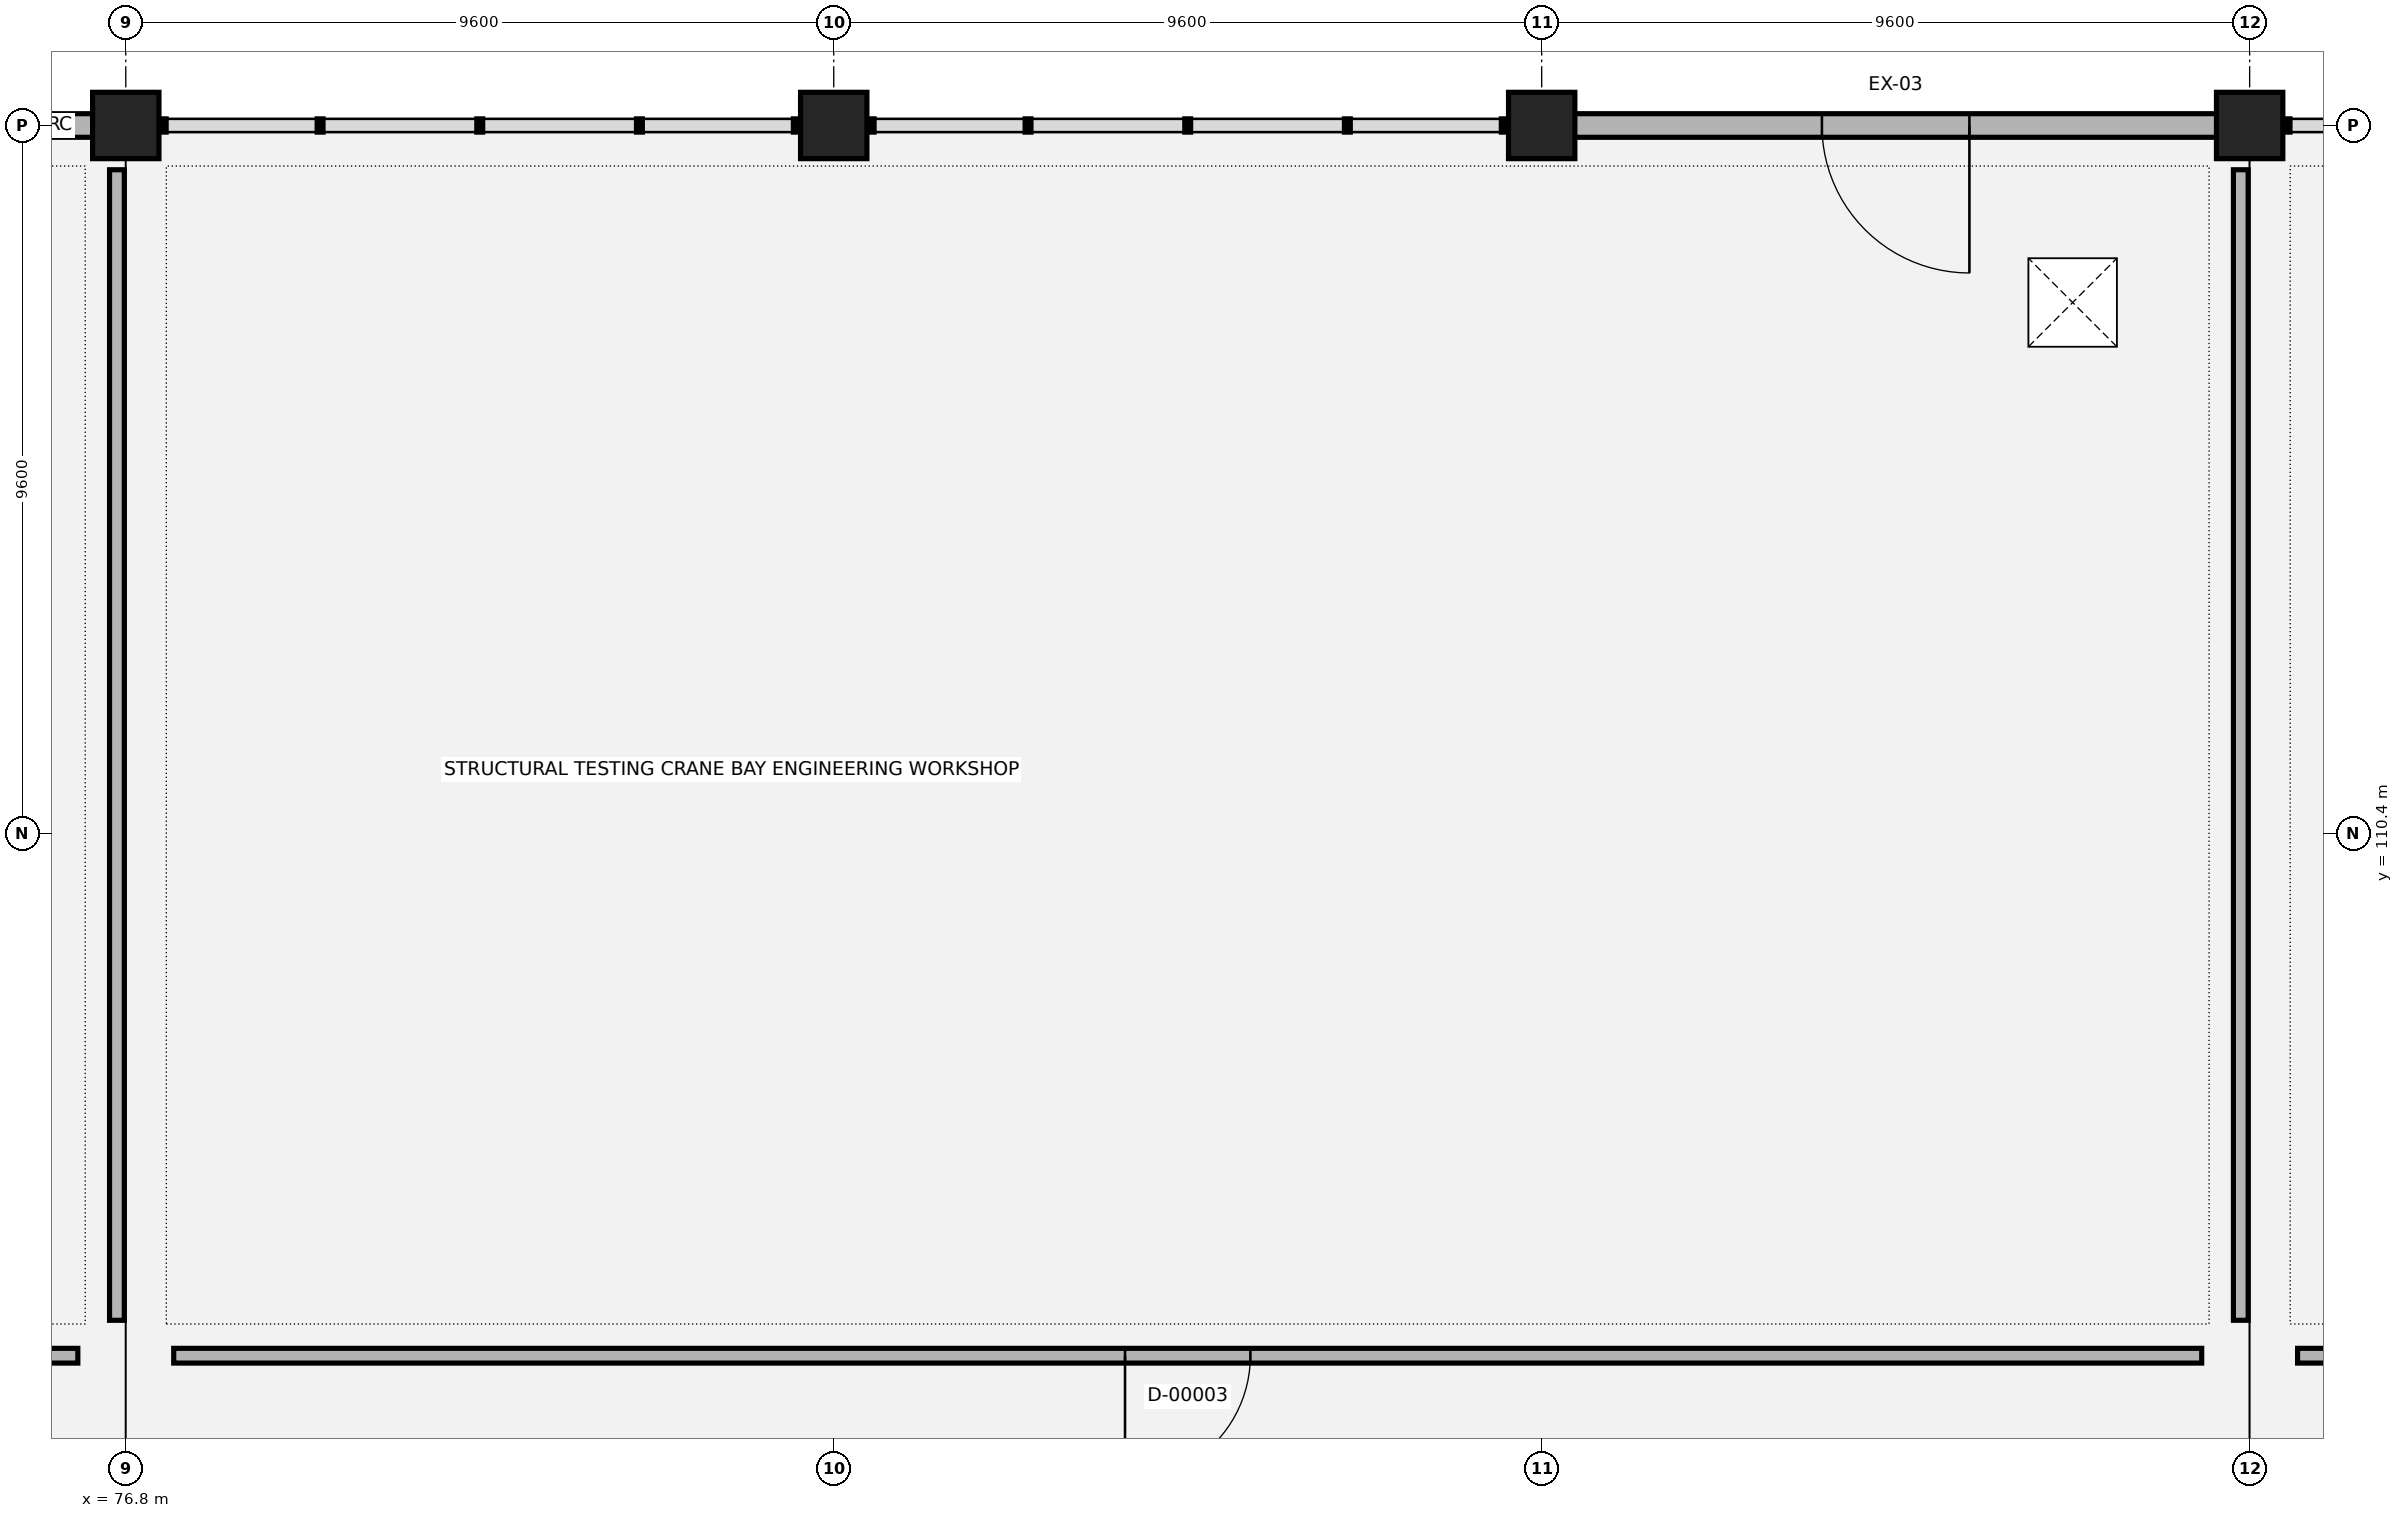
"""IFC4 building model, lengths in metres.
Left out: names, types, materials, properties, quantities, classifications, styles, units other than length and angle.
Written with IfcOpenShell. Run it as: python <this file> out.ifc"""

import sys

from ifc_helpers import new_model, si_unit, direction, frame, frame_2d, origin, origin_2d, place, context, subcontext, project, spatial, rectangle, extrude, element, fill, save


model = new_model("IFC4")
c1 = context("Model", 3, precision=1e-05, world=origin(), true_north=direction((0.0, 1.0)))
c2 = subcontext(c1, "Body", "Model", "MODEL_VIEW")
j1 = project(units=[si_unit("LENGTHUNIT", "METRE"), si_unit("PLANEANGLEUNIT", "RADIAN")], contexts=[c1])
p1 = place(None, origin())
s1 = spatial("IfcSite", under=j1, at=p1, CompositionType="ELEMENT")
p2 = place(p1, origin())
s2 = spatial("IfcBuilding", under=s1, at=p2, CompositionType="ELEMENT")
p3 = place(p2, origin())
s3 = spatial("IfcBuildingStorey", under=s2, at=p3, CompositionType="ELEMENT", Elevation=0.0)
for number, where, z_axis, x_axis in (
    (1, (76.8, 120.0, 0.0), (0.0, 0.0, 1.0), (1.0, 0.0, 0.0)),
    (2, (86.4, 120.0, 0.0), (0.0, 0.0, 1.0), (1.0, 0.0, 0.0)),
    (3, (96.0, 120.0, 0.0), (0.0, 0.0, 1.0), (1.0, 0.0, 0.0)),
    (4, (105.6, 120.0, 0.0), (0.0, 0.0, 1.0), (1.0, 0.0, 0.0)),
):
    element("IfcColumn", number, at=place(p3, frame(where, z_axis=z_axis, x_axis=x_axis)), inside=s3, PredefinedType="COLUMN", context=c2, shape_type="SweptSolid", body=[
        extrude(rectangle(XDim=0.9, YDim=0.9, at=origin_2d()), origin(), (0.0, 0.0, 1.0), 5.4),
    ])
p4 = place(p3, frame((76.42, 120.0, 0.0), z_axis=(0.0, 0.0, 1.0), x_axis=(-1.0, 0.0, 0.0)))
e5 = element("IfcWall", 5, at=p4, inside=s3, PredefinedType="SOLIDWALL", context=c2, shape_type="SweptSolid", body=[
    extrude(rectangle(XDim=8.84, YDim=0.32, at=frame_2d((4.42, 0.0))), origin(), (0.0, 0.0, 1.0), 4.04),
])
p5 = place(p4, frame((3.42, 0.0, 0.0)))
e6 = element("IfcOpeningElement", 6, at=p5, cuts=e5, PredefinedType="OPENING", context=c2, shape_type="SweptSolid", body=[
    extrude(rectangle(XDim=2.0, YDim=2.2, at=frame_2d((1.0, 1.1))), frame((0.0, 0.17, 0.0), z_axis=(0.0, -1.0, 0.0), x_axis=(1.0, 0.0, 0.0)), (0.0, 0.0, 1.0), 0.34),
])
p6 = place(p3, frame((105.22, 120.0, 0.0), z_axis=(0.0, 0.0, 1.0), x_axis=(-1.0, 0.0, 0.0)))
e7 = element("IfcWall", 7, at=p6, inside=s3, PredefinedType="SOLIDWALL", context=c2, shape_type="SweptSolid", body=[
    extrude(rectangle(XDim=8.84, YDim=0.32, at=frame_2d((4.42, 0.0))), origin(), (0.0, 0.0, 1.0), 4.04),
])
p7 = place(p6, frame((3.42, 0.0, 0.0)))
e8 = element("IfcOpeningElement", 8, at=p7, cuts=e7, PredefinedType="OPENING", context=c2, shape_type="SweptSolid", body=[
    extrude(rectangle(XDim=2.0, YDim=2.2, at=frame_2d((1.0, 1.1))), frame((0.0, 0.17, 0.0), z_axis=(0.0, -1.0, 0.0), x_axis=(1.0, 0.0, 0.0)), (0.0, 0.0, 1.0), 0.34),
])
p8 = place(p3, frame((48.65, 103.32, 0.0), z_axis=(0.0, 0.0, 1.0), x_axis=(1.0, 0.0, 0.0)))
e9 = element("IfcWall", 9, at=p8, inside=s3, PredefinedType="PARTITIONING", context=c2, shape_type="SweptSolid", body=[
    extrude(rectangle(XDim=27.5, YDim=0.2, at=frame_2d((13.75, 0.0))), origin(), (0.0, 0.0, 1.0), 4.04),
])
p9 = place(p8, frame((4.135, 0.0, 0.0)))
e10 = element("IfcOpeningElement", 10, at=p9, cuts=e9, PredefinedType="OPENING", context=c2, shape_type="SweptSolid", body=[
    extrude(rectangle(XDim=1.8, YDim=2.2, at=frame_2d((0.9, 1.1))), frame((0.0, 0.11, 0.0), z_axis=(0.0, -1.0, 0.0), x_axis=(1.0, 0.0, 0.0)), (0.0, 0.0, 1.0), 0.22),
])
p10 = place(p3, frame((76.68, 103.8, 0.0), z_axis=(0.0, 0.0, 1.0), x_axis=(0.0, 1.0, 0.0)))
e11 = element("IfcWall", 11, at=p10, inside=s3, PredefinedType="PARTITIONING", context=c2, shape_type="SweptSolid", body=[
    extrude(rectangle(XDim=15.6, YDim=0.2, at=frame_2d((7.8, 0.0))), origin(), (0.0, 0.0, 1.0), 4.04),
])
p11 = place(p3, frame((77.45, 103.32, 0.0), z_axis=(0.0, 0.0, 1.0), x_axis=(1.0, 0.0, 0.0)))
e12 = element("IfcWall", 12, at=p11, inside=s3, PredefinedType="PARTITIONING", context=c2, shape_type="SweptSolid", body=[
    extrude(rectangle(XDim=27.5, YDim=0.2, at=frame_2d((13.75, 0.0))), origin(), (0.0, 0.0, 1.0), 4.04),
])
p12 = place(p11, frame((12.9, 0.0, 0.0)))
e13 = element("IfcOpeningElement", 13, at=p12, cuts=e12, PredefinedType="OPENING", context=c2, shape_type="SweptSolid", body=[
    extrude(rectangle(XDim=1.7, YDim=2.2, at=frame_2d((0.85, 1.1))), frame((0.0, 0.11, 0.0), z_axis=(0.0, -1.0, 0.0), x_axis=(1.0, 0.0, 0.0)), (0.0, 0.0, 1.0), 0.22),
])
p13 = place(p3, frame((105.48, 103.8, 0.0), z_axis=(0.0, 0.0, 1.0), x_axis=(0.0, 1.0, 0.0)))
e14 = element("IfcWall", 14, at=p13, inside=s3, PredefinedType="PARTITIONING", context=c2, shape_type="SweptSolid", body=[
    extrude(rectangle(XDim=15.6, YDim=0.2, at=frame_2d((7.8, 0.0))), origin(), (0.0, 0.0, 1.0), 4.04),
])
p14 = place(p3, frame((106.25, 103.32, 0.0), z_axis=(0.0, 0.0, 1.0), x_axis=(1.0, 0.0, 0.0)))
e15 = element("IfcWall", 15, at=p14, inside=s3, PredefinedType="PARTITIONING", context=c2, shape_type="SweptSolid", body=[
    extrude(rectangle(XDim=27.5, YDim=0.2, at=frame_2d((13.75, 0.0))), origin(), (0.0, 0.0, 1.0), 4.04),
])
p15 = place(p14, frame((4.135, 0.0, 0.0)))
e16 = element("IfcOpeningElement", 16, at=p15, cuts=e15, PredefinedType="OPENING", context=c2, shape_type="SweptSolid", body=[
    extrude(rectangle(XDim=1.8, YDim=2.2, at=frame_2d((0.9, 1.1))), frame((0.0, 0.11, 0.0), z_axis=(0.0, -1.0, 0.0), x_axis=(1.0, 0.0, 0.0)), (0.0, 0.0, 1.0), 0.22),
])
p16 = place(p7, origin())
e17 = element("IfcDoor", 17, at=p16, inside=s3, OperationType="SINGLE_SWING_LEFT", PredefinedType="DOOR", context=c2, shape_type="SweptSolid", body=[
    extrude(rectangle(XDim=2.0, YDim=2.2, at=frame_2d((1.0, 1.1))), frame((0.0, 0.025, 0.0), z_axis=(0.0, -1.0, 0.0), x_axis=(1.0, 0.0, 0.0)), (0.0, 0.0, 1.0), 0.05),
])
fill(e8, e17)
p17 = place(p12, origin())
e18 = element("IfcDoor", 18, at=p17, inside=s3, OperationType="SINGLE_SWING_RIGHT", PredefinedType="DOOR", context=c2, shape_type="SweptSolid", body=[
    extrude(rectangle(XDim=1.7, YDim=2.2, at=frame_2d((0.85, 1.1))), frame((0.0, 0.025, 0.0), z_axis=(0.0, -1.0, 0.0), x_axis=(1.0, 0.0, 0.0)), (0.0, 0.0, 1.0), 0.05),
])
fill(e13, e18)
save(model, sys.argv[1])
